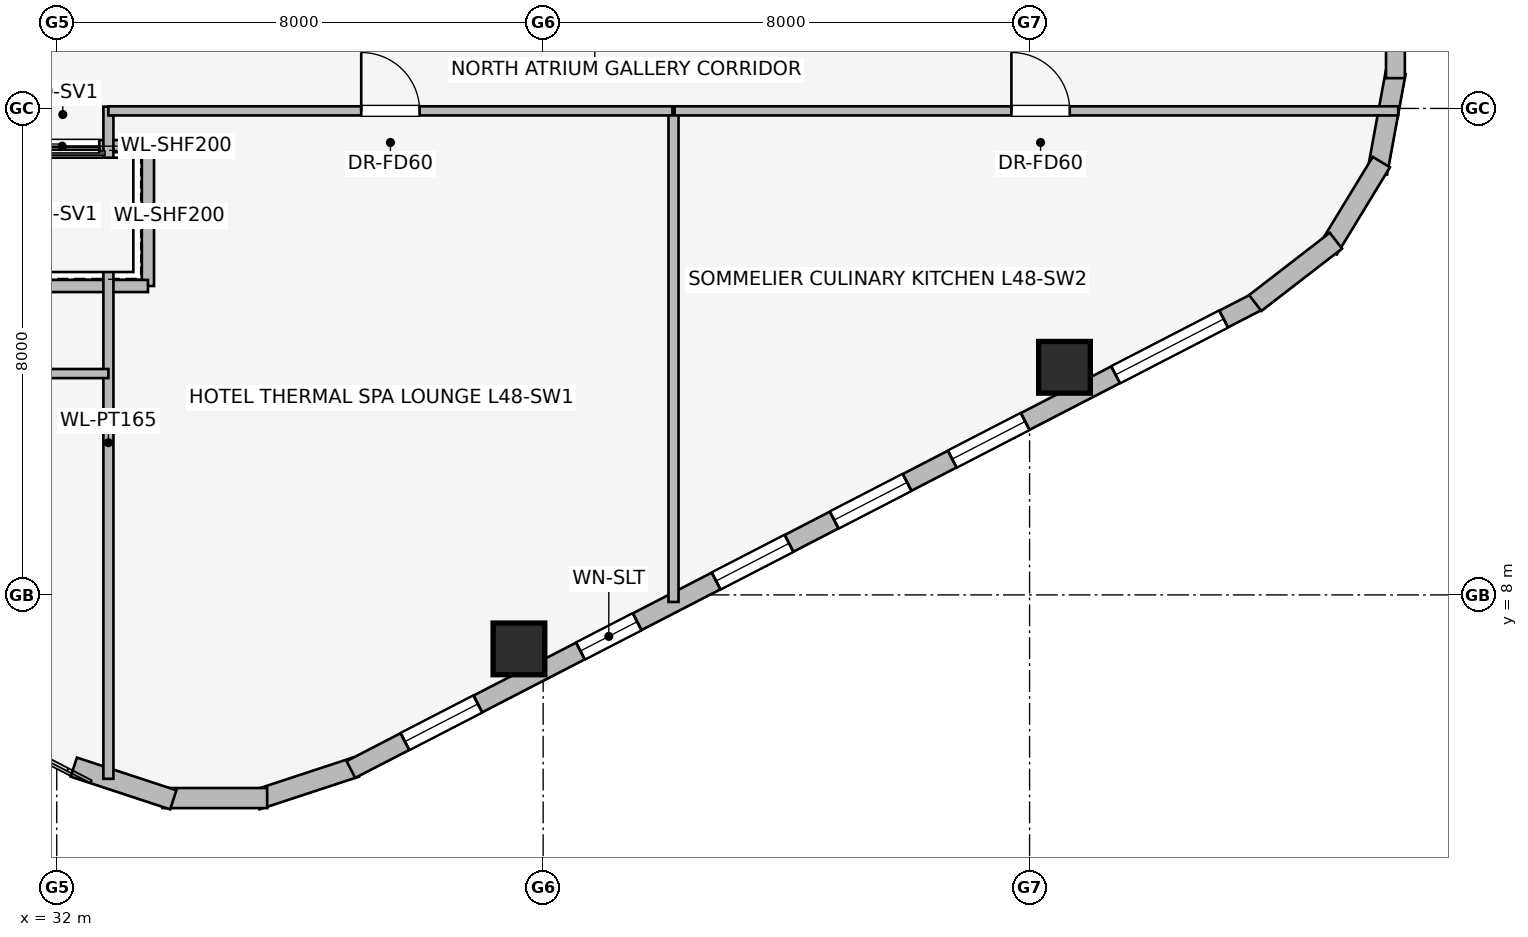
"""IFC4 building model, lengths in metres.
Left out: names, types, materials, properties, quantities, classifications, styles, units other than length and angle.
Written with IfcOpenShell. Run it as: python <this file> out.ifc"""

import sys

from ifc_helpers import new_model, si_unit, direction, frame, frame_2d, origin, origin_2d, place, context, subcontext, project, spatial, rectangle, extrude, element, fill, save


model = new_model("IFC4")
c1 = context("Model", 3, precision=1e-05, world=origin(), true_north=direction((0.0, 1.0)))
c2 = subcontext(c1, "Body", "Model", "MODEL_VIEW")
j1 = project(units=[si_unit("LENGTHUNIT", "METRE"), si_unit("PLANEANGLEUNIT", "RADIAN")], contexts=[c1])
p1 = place(None, origin())
s1 = spatial("IfcSite", under=j1, at=p1, CompositionType="ELEMENT")
p2 = place(p1, origin())
s2 = spatial("IfcBuilding", under=s1, at=p2, CompositionType="ELEMENT")
p3 = place(p2, frame((0.0, 0.0, 177.45)))
s3 = spatial("IfcBuildingStorey", under=s2, at=p3, CompositionType="ELEMENT", Elevation=177.45)
for number, where, z_axis, x_axis in (
    (1, (39.602, 7.112, 0.0), (0.0, 0.0, 1.0), (1.0, 0.0, 0.0)),
    (2, (48.574, 11.743, 0.0), (0.0, 0.0, 1.0), (1.0, 0.0, 0.0)),
):
    element("IfcColumn", number, at=place(p3, frame(where, z_axis=z_axis, x_axis=x_axis)), inside=s3, PredefinedType="COLUMN", context=c2, shape_type="SweptSolid", body=[
        extrude(rectangle(XDim=0.85, YDim=0.85, at=origin_2d()), origin(), (0.0, 0.0, 1.0), 3.45),
    ])
p4 = place(p3, frame((36.919, 5.168, 0.0), z_axis=(0.0, 0.0, 1.0), x_axis=(-0.949937416267, -0.312440242569, 0.0)))
e3 = element("IfcWall", 3, at=p4, inside=s3, PredefinedType="STANDARD", context=c2, shape_type="SweptSolid", body=[
    extrude(rectangle(XDim=1.722, YDim=0.33, at=frame_2d((0.861, 0.0))), origin(), (0.0, 0.0, 1.0), 3.16),
])
p5 = place(p3, frame((35.461, 4.659, 0.0), z_axis=(0.0, 0.0, 1.0), x_axis=(-1.0, 0.0, 0.0)))
e4 = element("IfcWall", 4, at=p5, inside=s3, PredefinedType="STANDARD", context=c2, shape_type="SweptSolid", body=[
    extrude(rectangle(XDim=1.722, YDim=0.33, at=frame_2d((0.861, 0.0))), origin(), (0.0, 0.0, 1.0), 3.16),
])
p6 = place(p3, frame((33.917, 4.63, 0.0), z_axis=(0.0, 0.0, 1.0), x_axis=(-0.949937416267, 0.312440242569, 0.0)))
e5 = element("IfcWall", 5, at=p6, inside=s3, PredefinedType="STANDARD", context=c2, shape_type="SweptSolid", body=[
    extrude(rectangle(XDim=1.722, YDim=0.33, at=frame_2d((0.861, 0.0))), origin(), (0.0, 0.0, 1.0), 3.16),
])
p7 = place(p3, frame((51.792, 12.847, 0.0), z_axis=(0.0, 0.0, 1.0), x_axis=(-0.888626188278, -0.458632202867, 0.0)))
e6 = element("IfcWall", 6, at=p7, inside=s3, PredefinedType="STANDARD", context=c2, shape_type="SweptSolid", body=[
    extrude(rectangle(XDim=16.828, YDim=0.31, at=frame_2d((8.414, 0.0))), origin(), (0.0, 0.0, 1.0), 3.16),
])
p8 = place(p7, frame((0.675, 0.0, 0.75)))
e7 = element("IfcOpeningElement", 7, at=p8, cuts=e6, PredefinedType="OPENING", context=c2, shape_type="SweptSolid", body=[
    extrude(rectangle(XDim=2.0, YDim=1.5, at=frame_2d((1.0, 0.75))), frame((0.0, 0.165, 0.0), z_axis=(0.0, -1.0, 0.0), x_axis=(1.0, 0.0, 0.0)), (0.0, 0.0, 1.0), 0.33),
])
p9 = place(p7, frame((4.349, 0.0, 0.75)))
e8 = element("IfcOpeningElement", 8, at=p9, cuts=e6, PredefinedType="OPENING", context=c2, shape_type="SweptSolid", body=[
    extrude(rectangle(XDim=1.35, YDim=1.45, at=frame_2d((0.675, 0.725))), frame((0.0, 0.165, 0.0), z_axis=(0.0, -1.0, 0.0), x_axis=(1.0, 0.0, 0.0)), (0.0, 0.0, 1.0), 0.33),
])
p10 = place(p7, frame((6.534, 0.0, 0.75)))
e9 = element("IfcOpeningElement", 9, at=p10, cuts=e6, PredefinedType="OPENING", context=c2, shape_type="SweptSolid", body=[
    extrude(rectangle(XDim=1.35, YDim=1.45, at=frame_2d((0.675, 0.725))), frame((0.0, 0.165, 0.0), z_axis=(0.0, -1.0, 0.0), x_axis=(1.0, 0.0, 0.0)), (0.0, 0.0, 1.0), 0.33),
])
p11 = place(p7, frame((8.719, 0.0, 0.75)))
e10 = element("IfcOpeningElement", 10, at=p11, cuts=e6, PredefinedType="OPENING", context=c2, shape_type="SweptSolid", body=[
    extrude(rectangle(XDim=1.35, YDim=1.45, at=frame_2d((0.675, 0.725))), frame((0.0, 0.165, 0.0), z_axis=(0.0, -1.0, 0.0), x_axis=(1.0, 0.0, 0.0)), (0.0, 0.0, 1.0), 0.33),
])
p12 = place(p7, frame((11.53, 0.0, 0.75)))
e11 = element("IfcOpeningElement", 11, at=p12, cuts=e6, PredefinedType="OPENING", context=c2, shape_type="SweptSolid", body=[
    extrude(rectangle(XDim=1.05, YDim=1.4, at=frame_2d((0.525, 0.7))), frame((0.0, 0.165, 0.0), z_axis=(0.0, -1.0, 0.0), x_axis=(1.0, 0.0, 0.0)), (0.0, 0.0, 1.0), 0.33),
])
p13 = place(p7, frame((14.478, 0.0, 0.75)))
e12 = element("IfcOpeningElement", 12, at=p13, cuts=e6, PredefinedType="OPENING", context=c2, shape_type="SweptSolid", body=[
    extrude(rectangle(XDim=1.35, YDim=1.45, at=frame_2d((0.675, 0.725))), frame((0.0, 0.165, 0.0), z_axis=(0.0, -1.0, 0.0), x_axis=(1.0, 0.0, 0.0)), (0.0, 0.0, 1.0), 0.33),
])
p14 = place(p3, frame((54.021, 16.592, 0.0), z_axis=(0.0, 0.0, 1.0), x_axis=(-0.180717642671, -0.983535019014, 0.0)))
e13 = element("IfcWall", 13, at=p14, inside=s3, PredefinedType="STANDARD", context=c2, shape_type="SweptSolid", body=[
    extrude(rectangle(XDim=1.677, YDim=0.33, at=frame_2d((0.838, 0.0))), origin(), (0.0, 0.0, 1.0), 3.16),
])
p15 = place(p3, frame((53.785, 15.118, 0.0), z_axis=(0.0, 0.0, 1.0), x_axis=(-0.520219286058, -0.85403272444, 0.0)))
e14 = element("IfcWall", 14, at=p15, inside=s3, PredefinedType="STANDARD", context=c2, shape_type="SweptSolid", body=[
    extrude(rectangle(XDim=1.678, YDim=0.33, at=frame_2d((0.839, 0.0))), origin(), (0.0, 0.0, 1.0), 3.16),
])
p16 = place(p3, frame((53.038, 13.825, 0.0), z_axis=(0.0, 0.0, 1.0), x_axis=(-0.791464279355, -0.611215423976, 0.0)))
e15 = element("IfcWall", 15, at=p16, inside=s3, PredefinedType="STANDARD", context=c2, shape_type="SweptSolid", body=[
    extrude(rectangle(XDim=1.677, YDim=0.33, at=frame_2d((0.838, 0.0))), origin(), (0.0, 0.0, 1.0), 3.16),
])
p17 = place(p3, frame((54.017, 31.502, 0.0), z_axis=(0.0, 0.0, 1.0), x_axis=(0.0, -1.0, 0.0)))
e16 = element("IfcWall", 16, at=p17, inside=s3, PredefinedType="STANDARD", context=c2, shape_type="SweptSolid", body=[
    extrude(rectangle(XDim=15.004, YDim=0.31, at=frame_2d((7.502, 0.0))), origin(), (0.0, 0.0, 1.0), 3.16),
])
p18 = place(p17, frame((4.353, 0.0, 0.75)))
e17 = element("IfcOpeningElement", 17, at=p18, cuts=e16, PredefinedType="OPENING", context=c2, shape_type="SweptSolid", body=[
    extrude(rectangle(XDim=2.0, YDim=1.5, at=frame_2d((1.0, 0.75))), frame((0.0, 0.165, 0.0), z_axis=(0.0, -1.0, 0.0), x_axis=(1.0, 0.0, 0.0)), (0.0, 0.0, 1.0), 0.33),
])
p19 = place(p17, frame((8.083, 0.0, 0.75)))
e18 = element("IfcOpeningElement", 18, at=p19, cuts=e16, PredefinedType="OPENING", context=c2, shape_type="SweptSolid", body=[
    extrude(rectangle(XDim=1.35, YDim=1.45, at=frame_2d((0.675, 0.725))), frame((0.0, 0.165, 0.0), z_axis=(0.0, -1.0, 0.0), x_axis=(1.0, 0.0, 0.0)), (0.0, 0.0, 1.0), 0.33),
])
p20 = place(p17, frame((9.87, 0.0, 0.75)))
e19 = element("IfcOpeningElement", 19, at=p20, cuts=e16, PredefinedType="OPENING", context=c2, shape_type="SweptSolid", body=[
    extrude(rectangle(XDim=1.35, YDim=1.45, at=frame_2d((0.675, 0.725))), frame((0.0, 0.165, 0.0), z_axis=(0.0, -1.0, 0.0), x_axis=(1.0, 0.0, 0.0)), (0.0, 0.0, 1.0), 0.33),
])
p21 = place(p3, frame((33.5, 15.38, 0.0), z_axis=(0.0, 0.0, 1.0), x_axis=(-1.0, 0.0, 0.0)))
e20 = element("IfcWall", 20, at=p21, inside=s3, PredefinedType="PARTITIONING", context=c2, shape_type="SweptSolid", body=[
    extrude(rectangle(XDim=2.82, YDim=0.2, at=frame_2d((1.41, 0.0))), origin(), (0.0, 0.0, 1.0), 3.16),
])
p22 = place(p21, frame((0.8, 0.0, 0.0)))
e21 = element("IfcOpeningElement", 21, at=p22, cuts=e20, PredefinedType="OPENING", context=c2, shape_type="SweptSolid", body=[
    extrude(rectangle(XDim=1.2, YDim=2.2, at=frame_2d((0.6, 1.1))), frame((0.0, 0.11, 0.0), z_axis=(0.0, -1.0, 0.0), x_axis=(1.0, 0.0, 0.0)), (0.0, 0.0, 1.0), 0.22),
])
p23 = place(p3, frame((33.5, 13.08, 0.0), z_axis=(0.0, 0.0, 1.0), x_axis=(0.0, 1.0, 0.0)))
e22 = element("IfcWall", 22, at=p23, inside=s3, PredefinedType="PARTITIONING", context=c2, shape_type="SweptSolid", body=[
    extrude(rectangle(XDim=2.3, YDim=0.2, at=frame_2d((1.15, 0.0))), origin(), (0.0, 0.0, 1.0), 3.16),
])
p24 = place(p3, frame((30.879, 13.08, 0.0), z_axis=(0.0, 0.0, 1.0), x_axis=(1.0, 0.0, 0.0)))
e23 = element("IfcWall", 23, at=p24, inside=s3, PredefinedType="PARTITIONING", context=c2, shape_type="SweptSolid", body=[
    extrude(rectangle(XDim=2.621, YDim=0.2, at=frame_2d((1.311, 0.0))), origin(), (0.0, 0.0, 1.0), 3.16),
])
p25 = place(p3, frame((32.85, 4.976, 0.0), z_axis=(0.0, 0.0, 1.0), x_axis=(0.0, 1.0, 0.0)))
e24 = element("IfcWall", 24, at=p25, inside=s3, PredefinedType="PARTITIONING", context=c2, shape_type="SweptSolid", body=[
    extrude(rectangle(XDim=11.054, YDim=0.165, at=frame_2d((5.527, 0.0))), origin(), (0.0, 0.0, 1.0), 3.16),
])
p26 = place(p3, frame((21.1, 11.64, 0.0), z_axis=(0.0, 0.0, 1.0), x_axis=(1.0, 0.0, 0.0)))
e25 = element("IfcWall", 25, at=p26, inside=s3, PredefinedType="PARTITIONING", context=c2, shape_type="SweptSolid", body=[
    extrude(rectangle(XDim=11.75, YDim=0.15, at=frame_2d((5.875, 0.0))), origin(), (0.0, 0.0, 1.0), 3.16),
])
p27 = place(p26, frame((1.9, 0.0, 0.0)))
e26 = element("IfcOpeningElement", 26, at=p27, cuts=e25, PredefinedType="OPENING", context=c2, shape_type="SweptSolid", body=[
    extrude(rectangle(XDim=0.9, YDim=2.0, at=frame_2d((0.45, 1.0))), frame((0.0, 0.085, 0.0), z_axis=(0.0, -1.0, 0.0), x_axis=(1.0, 0.0, 0.0)), (0.0, 0.0, 1.0), 0.17),
])
p28 = place(p3, frame((42.144, 7.884, 0.0), z_axis=(0.0, 0.0, 1.0), x_axis=(0.0, 1.0, 0.0)))
e27 = element("IfcWall", 27, at=p28, inside=s3, PredefinedType="PARTITIONING", context=c2, shape_type="SweptSolid", body=[
    extrude(rectangle(XDim=8.046, YDim=0.165, at=frame_2d((4.023, 0.0))), origin(), (0.0, 0.0, 1.0), 3.16),
])
p29 = place(p3, frame((32.85, 15.96, 0.0), z_axis=(0.0, 0.0, 1.0), x_axis=(1.0, 0.0, 0.0)))
e28 = element("IfcWall", 28, at=p29, inside=s3, PredefinedType="PARTITIONING", context=c2, shape_type="SweptSolid", body=[
    extrude(rectangle(XDim=9.276, YDim=0.15, at=frame_2d((4.638, 0.0))), origin(), (0.0, 0.0, 1.0), 3.16),
])
p30 = place(p29, frame((4.158, 0.0, 0.0)))
e29 = element("IfcOpeningElement", 29, at=p30, cuts=e28, PredefinedType="OPENING", context=c2, shape_type="SweptSolid", body=[
    extrude(rectangle(XDim=0.96, YDim=2.0, at=frame_2d((0.48, 1.0))), frame((0.0, 0.085, 0.0), z_axis=(0.0, -1.0, 0.0), x_axis=(1.0, 0.0, 0.0)), (0.0, 0.0, 1.0), 0.17),
])
p31 = place(p3, frame((42.162, 15.96, 0.0), z_axis=(0.0, 0.0, 1.0), x_axis=(1.0, 0.0, 0.0)))
e30 = element("IfcWall", 30, at=p31, inside=s3, PredefinedType="PARTITIONING", context=c2, shape_type="SweptSolid", body=[
    extrude(rectangle(XDim=11.901, YDim=0.15, at=frame_2d((5.95, 0.0))), origin(), (0.0, 0.0, 1.0), 3.16),
])
p32 = place(p31, frame((5.539, 0.0, 0.0)))
e31 = element("IfcOpeningElement", 31, at=p32, cuts=e30, PredefinedType="OPENING", context=c2, shape_type="SweptSolid", body=[
    extrude(rectangle(XDim=0.96, YDim=2.0, at=frame_2d((0.48, 1.0))), frame((0.0, 0.085, 0.0), z_axis=(0.0, -1.0, 0.0), x_axis=(1.0, 0.0, 0.0)), (0.0, 0.0, 1.0), 0.17),
])
p33 = place(p8, origin())
e32 = element("IfcWindow", 32, at=p33, inside=s3, PartitioningType="SINGLE_PANEL", PredefinedType="WINDOW", context=c2, shape_type="SweptSolid", body=[
    extrude(rectangle(XDim=2.0, YDim=1.5, at=frame_2d((1.0, 0.75))), frame((0.0, 0.03, 0.0), z_axis=(0.0, -1.0, 0.0), x_axis=(1.0, 0.0, 0.0)), (0.0, 0.0, 1.0), 0.06),
])
fill(e7, e32)
p34 = place(p9, origin())
e33 = element("IfcWindow", 33, at=p34, inside=s3, PartitioningType="SINGLE_PANEL", PredefinedType="WINDOW", context=c2, shape_type="SweptSolid", body=[
    extrude(rectangle(XDim=1.35, YDim=1.45, at=frame_2d((0.675, 0.725))), frame((0.0, 0.03, 0.0), z_axis=(0.0, -1.0, 0.0), x_axis=(1.0, 0.0, 0.0)), (0.0, 0.0, 1.0), 0.06),
])
fill(e8, e33)
p35 = place(p10, origin())
e34 = element("IfcWindow", 34, at=p35, inside=s3, PartitioningType="SINGLE_PANEL", PredefinedType="WINDOW", context=c2, shape_type="SweptSolid", body=[
    extrude(rectangle(XDim=1.35, YDim=1.45, at=frame_2d((0.675, 0.725))), frame((0.0, 0.03, 0.0), z_axis=(0.0, -1.0, 0.0), x_axis=(1.0, 0.0, 0.0)), (0.0, 0.0, 1.0), 0.06),
])
fill(e9, e34)
p36 = place(p11, origin())
e35 = element("IfcWindow", 35, at=p36, inside=s3, PartitioningType="SINGLE_PANEL", PredefinedType="WINDOW", context=c2, shape_type="SweptSolid", body=[
    extrude(rectangle(XDim=1.35, YDim=1.45, at=frame_2d((0.675, 0.725))), frame((0.0, 0.03, 0.0), z_axis=(0.0, -1.0, 0.0), x_axis=(1.0, 0.0, 0.0)), (0.0, 0.0, 1.0), 0.06),
])
fill(e10, e35)
p37 = place(p12, origin())
e36 = element("IfcWindow", 36, at=p37, inside=s3, PartitioningType="SINGLE_PANEL", PredefinedType="WINDOW", context=c2, shape_type="SweptSolid", body=[
    extrude(rectangle(XDim=1.05, YDim=1.4, at=frame_2d((0.525, 0.7))), frame((0.0, 0.03, 0.0), z_axis=(0.0, -1.0, 0.0), x_axis=(1.0, 0.0, 0.0)), (0.0, 0.0, 1.0), 0.06),
])
fill(e11, e36)
p38 = place(p13, origin())
e37 = element("IfcWindow", 37, at=p38, inside=s3, PartitioningType="SINGLE_PANEL", PredefinedType="WINDOW", context=c2, shape_type="SweptSolid", body=[
    extrude(rectangle(XDim=1.35, YDim=1.45, at=frame_2d((0.675, 0.725))), frame((0.0, 0.03, 0.0), z_axis=(0.0, -1.0, 0.0), x_axis=(1.0, 0.0, 0.0)), (0.0, 0.0, 1.0), 0.06),
])
fill(e12, e37)
p39 = place(p22, origin())
e38 = element("IfcDoor", 38, at=p39, inside=s3, OperationType="SLIDING_TO_RIGHT", PredefinedType="DOOR", context=c2, shape_type="SweptSolid", body=[
    extrude(rectangle(XDim=1.2, YDim=2.2, at=frame_2d((0.6, 1.1))), frame((0.0, 0.025, 0.0), z_axis=(0.0, -1.0, 0.0), x_axis=(1.0, 0.0, 0.0)), (0.0, 0.0, 1.0), 0.05),
])
fill(e21, e38)
p40 = place(p30, origin())
e39 = element("IfcDoor", 39, at=p40, inside=s3, OperationType="SINGLE_SWING_LEFT", PredefinedType="DOOR", context=c2, shape_type="SweptSolid", body=[
    extrude(rectangle(XDim=0.96, YDim=2.0, at=frame_2d((0.48, 1.0))), frame((0.0, 0.025, 0.0), z_axis=(0.0, -1.0, 0.0), x_axis=(1.0, 0.0, 0.0)), (0.0, 0.0, 1.0), 0.05),
])
fill(e29, e39)
p41 = place(p32, origin())
e40 = element("IfcDoor", 40, at=p41, inside=s3, OperationType="SINGLE_SWING_LEFT", PredefinedType="DOOR", context=c2, shape_type="SweptSolid", body=[
    extrude(rectangle(XDim=0.96, YDim=2.0, at=frame_2d((0.48, 1.0))), frame((0.0, 0.025, 0.0), z_axis=(0.0, -1.0, 0.0), x_axis=(1.0, 0.0, 0.0)), (0.0, 0.0, 1.0), 0.05),
])
fill(e31, e40)
save(model, sys.argv[1])
